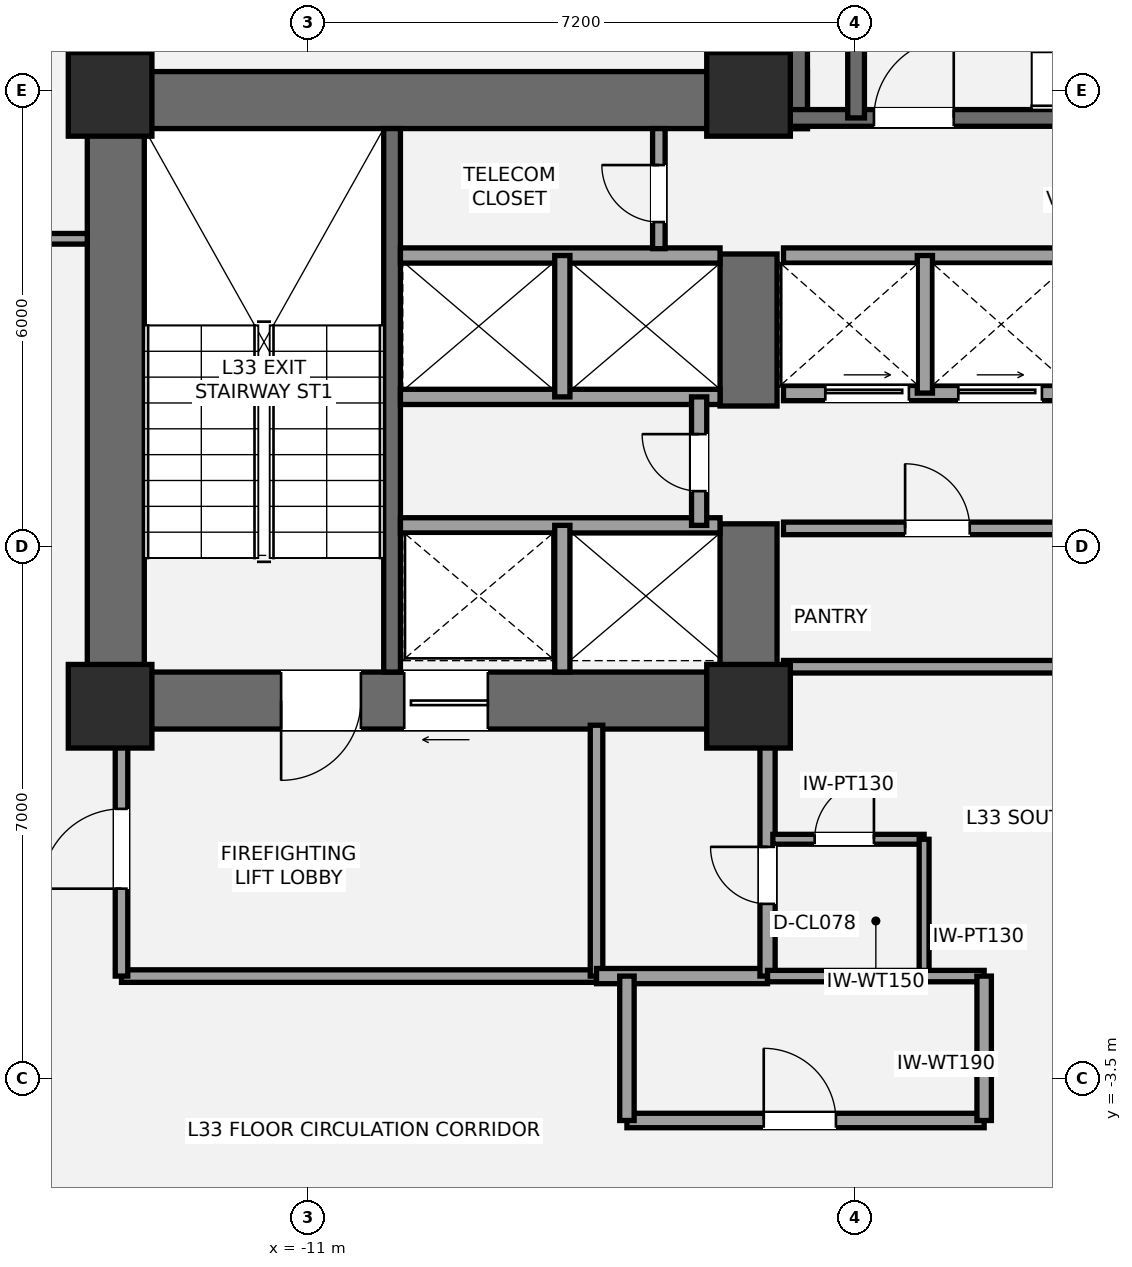
"""IFC4 building model, lengths in metres.
Left out: names, types, materials, properties, quantities, classifications, styles, units other than length and angle.
Written with IfcOpenShell. Run it as: python <this file> out.ifc"""

import sys

from ifc_helpers import new_model, si_unit, direction, frame, frame_2d, origin, origin_2d, place, context, subcontext, project, spatial, rectangle, extrude, element, fill, save


model = new_model("IFC4")
c1 = context("Model", 3, precision=1e-05, world=origin(), true_north=direction((0.0, 1.0)))
c2 = subcontext(c1, "Body", "Model", "MODEL_VIEW")
j1 = project(units=[si_unit("LENGTHUNIT", "METRE"), si_unit("PLANEANGLEUNIT", "RADIAN")], contexts=[c1])
p1 = place(None, origin())
s1 = spatial("IfcSite", under=j1, at=p1, CompositionType="ELEMENT")
p2 = place(p1, origin())
s2 = spatial("IfcBuilding", under=s1, at=p2, CompositionType="ELEMENT")
p3 = place(p2, frame((0.0, 0.0, 124.6)))
s3 = spatial("IfcBuildingStorey", under=s2, at=p3, CompositionType="ELEMENT", Elevation=124.6)
p4 = place(p3, frame((-13.525, 1.1, 0.0), z_axis=(0.0, 0.0, 1.0), x_axis=(0.0, 1.0, 0.0)))
e1 = element("IfcWall", 1, at=p4, inside=s3, PredefinedType="SHEAR", context=c2, shape_type="SweptSolid", body=[
    extrude(rectangle(XDim=8.65, YDim=0.75, at=frame_2d((4.325, 0.0))), origin(), (0.0, 0.0, 1.0), 3.5),
])
p5 = place(p3, frame((-13.9, 9.375, 0.0), z_axis=(0.0, 0.0, 1.0), x_axis=(1.0, 0.0, 0.0)))
e2 = element("IfcWall", 2, at=p5, inside=s3, PredefinedType="SHEAR", context=c2, shape_type="SweptSolid", body=[
    extrude(rectangle(XDim=9.475, YDim=0.75, at=frame_2d((4.737, 0.0))), origin(), (0.0, 0.0, 1.0), 3.5),
])
p6 = place(p3, frame((-4.825, 1.475, 0.0), z_axis=(0.0, 0.0, 1.0), x_axis=(-1.0, 0.0, 0.0)))
e3 = element("IfcWall", 3, at=p6, inside=s3, PredefinedType="SHEAR", context=c2, shape_type="SweptSolid", body=[
    extrude(rectangle(XDim=9.075, YDim=0.75, at=frame_2d((4.538, 0.0))), origin(), (0.0, 0.0, 1.0), 3.5),
])
p7 = place(p6, frame((5.475, 0.0, 0.0)))
e4 = element("IfcOpeningElement", 4, at=p7, cuts=e3, PredefinedType="OPENING", context=c2, shape_type="SweptSolid", body=[
    extrude(rectangle(XDim=1.05, YDim=2.15, at=frame_2d((0.525, 1.075))), frame((0.0, 0.385, 0.0), z_axis=(0.0, -1.0, 0.0), x_axis=(1.0, 0.0, 0.0)), (0.0, 0.0, 1.0), 0.77),
])
p8 = place(p6, frame((3.805, 0.0, 0.0)))
e5 = element("IfcOpeningElement", 5, at=p8, cuts=e3, PredefinedType="OPENING", context=c2, shape_type="SweptSolid", body=[
    extrude(rectangle(XDim=1.1, YDim=2.2, at=frame_2d((0.55, 1.1))), frame((0.0, 0.385, 0.0), z_axis=(0.0, -1.0, 0.0), x_axis=(1.0, 0.0, 0.0)), (0.0, 0.0, 1.0), 0.77),
])
p9 = place(p3, frame((-5.2, 1.1, 0.0), z_axis=(0.0, 0.0, 1.0), x_axis=(0.0, 1.0, 0.0)))
e6 = element("IfcWall", 6, at=p9, inside=s3, PredefinedType="SHEAR", context=c2, shape_type="SweptSolid", body=[
    extrude(rectangle(XDim=2.7, YDim=0.75, at=frame_2d((1.35, 0.0))), origin(), (0.0, 0.0, 1.0), 3.5),
])
p10 = place(p3, frame((-5.2, 5.35, 0.0), z_axis=(0.0, 0.0, 1.0), x_axis=(0.0, 1.0, 0.0)))
e7 = element("IfcWall", 7, at=p10, inside=s3, PredefinedType="SHEAR", context=c2, shape_type="SweptSolid", body=[
    extrude(rectangle(XDim=2.0, YDim=0.75, at=frame_2d((1.0, 0.0))), origin(), (0.0, 0.0, 1.0), 3.5),
])
p11 = place(p3, frame((-9.89, 1.85, 0.0), z_axis=(0.0, 0.0, 1.0), x_axis=(0.0, 1.0, 0.0)))
e8 = element("IfcWall", 8, at=p11, inside=s3, PredefinedType="SHEAR", context=c2, shape_type="SweptSolid", body=[
    extrude(rectangle(XDim=7.15, YDim=0.22, at=frame_2d((3.575, 0.0))), origin(), (0.0, 0.0, 1.0), 3.5),
])
p12 = place(p3, frame((-4.8, 9.0, 0.0), z_axis=(0.0, 0.0, 1.0), x_axis=(0.0, 1.0, 0.0)))
e9 = element("IfcWall", 9, at=p12, inside=s3, PredefinedType="SHEAR", context=c2, shape_type="SweptSolid", body=[
    extrude(rectangle(XDim=4.15, YDim=0.75, at=frame_2d((2.075, 0.0))), origin(), (0.0, 0.0, 1.0), 3.5),
])
p13 = place(p3, frame((-4.7, 9.14, 0.0), z_axis=(0.0, 0.0, 1.0), x_axis=(1.0, 0.0, 0.0)))
e10 = element("IfcWall", 10, at=p13, inside=s3, PredefinedType="SHEAR", context=c2, shape_type="SweptSolid", body=[
    extrude(rectangle(XDim=9.3, YDim=0.22, at=frame_2d((4.65, 0.0))), origin(), (0.0, 0.0, 1.0), 3.5),
])
p14 = place(p13, frame((1.15, 0.0, 0.0)))
e11 = element("IfcOpeningElement", 11, at=p14, cuts=e10, PredefinedType="OPENING", context=c2, shape_type="SweptSolid", body=[
    extrude(rectangle(XDim=1.05, YDim=2.15, at=frame_2d((0.525, 1.075))), frame((0.0, 0.12, 0.0), z_axis=(0.0, -1.0, 0.0), x_axis=(1.0, 0.0, 0.0)), (0.0, 0.0, 1.0), 0.24),
])
p15 = place(p3, frame((-3.785, 9.14, 0.0), z_axis=(0.0, 0.0, 1.0), x_axis=(0.0, 1.0, 0.0)))
e12 = element("IfcWall", 12, at=p15, inside=s3, PredefinedType="SHEAR", context=c2, shape_type="SweptSolid", body=[
    extrude(rectangle(XDim=3.26, YDim=0.22, at=frame_2d((1.63, 0.0))), origin(), (0.0, 0.0, 1.0), 3.5),
])
for number, where, z_axis, x_axis in (
    (13, (-13.6, 1.4, 0.0), (0.0, 0.0, 1.0), (1.0, 0.0, 0.0)),
    (14, (-13.6, 9.45, 0.0), (0.0, 0.0, 1.0), (1.0, 0.0, 0.0)),
    (15, (-5.2, 1.4, 0.0), (0.0, 0.0, 1.0), (1.0, 0.0, 0.0)),
    (16, (-5.2, 9.45, 0.0), (0.0, 0.0, 1.0), (1.0, 0.0, 0.0)),
):
    element("IfcColumn", number, at=place(p3, frame(where, z_axis=z_axis, x_axis=x_axis)), inside=s3, PredefinedType="COLUMN", context=c2, shape_type="SweptSolid", body=[
        extrude(rectangle(XDim=1.1, YDim=1.1, at=origin_2d()), origin(), (0.0, 0.0, 1.0), 3.5),
    ])
p16 = place(p3, frame((-13.45, -2.15, 0.0), z_axis=(0.0, 0.0, 1.0), x_axis=(1.0, 0.0, 0.0)))
e17 = element("IfcWall", 17, at=p16, inside=s3, PredefinedType="PARTITIONING", context=c2, shape_type="SweptSolid", body=[
    extrude(rectangle(XDim=6.25, YDim=0.165, at=frame_2d((3.125, 0.0))), origin(), (0.0, 0.0, 1.0), 3.31),
])
p17 = place(p3, frame((-13.45, -2.15, 0.0), z_axis=(0.0, 0.0, 1.0), x_axis=(0.0, 1.0, 0.0)))
e18 = element("IfcWall", 18, at=p17, inside=s3, PredefinedType="PARTITIONING", context=c2, shape_type="SweptSolid", body=[
    extrude(rectangle(XDim=3.3, YDim=0.165, at=frame_2d((1.65, 0.0))), origin(), (0.0, 0.0, 1.0), 2.763),
])
p18 = place(p17, frame((1.15, 0.0, 0.0)))
e19 = element("IfcOpeningElement", 19, at=p18, cuts=e18, PredefinedType="OPENING", context=c2, shape_type="SweptSolid", body=[
    extrude(rectangle(XDim=1.05, YDim=2.15, at=frame_2d((0.525, 1.075))), frame((0.0, 0.093, 0.0), z_axis=(0.0, -1.0, 0.0), x_axis=(1.0, 0.0, 0.0)), (0.0, 0.0, 1.0), 0.185),
])
p19 = place(p3, frame((-7.2, -2.15, 0.0), z_axis=(0.0, 0.0, 1.0), x_axis=(0.0, 1.0, 0.0)))
e20 = element("IfcWall", 20, at=p19, inside=s3, PredefinedType="PARTITIONING", context=c2, shape_type="SweptSolid", body=[
    extrude(rectangle(XDim=3.3, YDim=0.165, at=frame_2d((1.65, 0.0))), origin(), (0.0, 0.0, 1.0), 2.763),
])
p20 = place(p3, frame((-7.2, -2.15, 0.0), z_axis=(0.0, 0.0, 1.0), x_axis=(1.0, 0.0, 0.0)))
e21 = element("IfcWall", 21, at=p20, inside=s3, PredefinedType="SOLIDWALL", context=c2, shape_type="SweptSolid", body=[
    extrude(rectangle(XDim=2.25, YDim=0.2, at=frame_2d((1.125, 0.0))), origin(), (0.0, 0.0, 1.0), 2.763),
])
p21 = place(p3, frame((-4.95, -2.15, 0.0), z_axis=(0.0, 0.0, 1.0), x_axis=(0.0, 1.0, 0.0)))
e22 = element("IfcWall", 22, at=p21, inside=s3, PredefinedType="SOLIDWALL", context=c2, shape_type="SweptSolid", body=[
    extrude(rectangle(XDim=3.3, YDim=0.2, at=frame_2d((1.65, 0.0))), origin(), (0.0, 0.0, 1.0), 2.763),
])
p22 = place(p21, frame((0.95, 0.0, 0.0)))
e23 = element("IfcOpeningElement", 23, at=p22, cuts=e22, PredefinedType="OPENING", context=c2, shape_type="SweptSolid", body=[
    extrude(rectangle(XDim=0.75, YDim=2.1, at=frame_2d((0.375, 1.05))), frame((0.0, 0.11, 0.0), z_axis=(0.0, -1.0, 0.0), x_axis=(1.0, 0.0, 0.0)), (0.0, 0.0, 1.0), 0.22),
])
p23 = place(p3, frame((-4.88, -0.35, 0.0), z_axis=(0.0, 0.0, 1.0), x_axis=(1.0, 0.0, 0.0)))
e24 = element("IfcWall", 24, at=p23, inside=s3, PredefinedType="PARTITIONING", context=c2, shape_type="SweptSolid", body=[
    extrude(rectangle(XDim=1.99, YDim=0.13, at=frame_2d((0.995, 0.0))), origin(), (0.0, 0.0, 1.0), 3.31),
])
p24 = place(p23, frame((0.55, 0.0, 0.0)))
e25 = element("IfcOpeningElement", 25, at=p24, cuts=e24, PredefinedType="OPENING", context=c2, shape_type="SweptSolid", body=[
    extrude(rectangle(XDim=0.78, YDim=2.1, at=frame_2d((0.39, 1.05))), frame((0.0, 0.075, 0.0), z_axis=(0.0, -1.0, 0.0), x_axis=(1.0, 0.0, 0.0)), (0.0, 0.0, 1.0), 0.15),
])
p25 = place(p3, frame((-2.89, -2.15, 0.0), z_axis=(0.0, 0.0, 1.0), x_axis=(0.0, 1.0, 0.0)))
e26 = element("IfcWall", 26, at=p25, inside=s3, PredefinedType="PARTITIONING", context=c2, shape_type="SweptSolid", body=[
    extrude(rectangle(XDim=1.8, YDim=0.13, at=frame_2d((0.9, 0.0))), origin(), (0.0, 0.0, 1.0), 2.763),
])
p26 = place(p3, frame((-9.78, 3.78, 0.0), z_axis=(0.0, 0.0, 1.0), x_axis=(1.0, 0.0, 0.0)))
e27 = element("IfcWall", 27, at=p26, inside=s3, PredefinedType="SOLIDWALL", context=c2, shape_type="SweptSolid", body=[
    extrude(rectangle(XDim=4.205, YDim=0.2, at=frame_2d((2.103, 0.0))), origin(), (0.0, 0.0, 1.0), 3.31),
])
p27 = place(p3, frame((-7.65, 1.85, 0.0), z_axis=(0.0, 0.0, 1.0), x_axis=(0.0, 1.0, 0.0)))
e28 = element("IfcWall", 28, at=p27, inside=s3, PredefinedType="SOLIDWALL", context=c2, shape_type="SweptSolid", body=[
    extrude(rectangle(XDim=1.93, YDim=0.2, at=frame_2d((0.965, 0.0))), origin(), (0.0, 0.0, 1.0), 3.31),
])
for number, where, z_axis, x_axis in (
    (29, (-9.78, 5.47, 0.0), (0.0, 0.0, 1.0), (1.0, 0.0, 0.0)),
    (30, (-9.78, 7.33, 0.0), (0.0, 0.0, 1.0), (1.0, 0.0, 0.0)),
):
    element("IfcWall", number, at=place(p3, frame(where, z_axis=z_axis, x_axis=x_axis)), inside=s3, PredefinedType="SOLIDWALL", context=c2, shape_type="SweptSolid", body=[
        extrude(rectangle(XDim=4.205, YDim=0.2, at=frame_2d((2.103, 0.0))), origin(), (0.0, 0.0, 1.0), 3.31),
    ])
p28 = place(p3, frame((-7.65, 5.47, 0.0), z_axis=(0.0, 0.0, 1.0), x_axis=(0.0, 1.0, 0.0)))
e31 = element("IfcWall", 31, at=p28, inside=s3, PredefinedType="SOLIDWALL", context=c2, shape_type="SweptSolid", body=[
    extrude(rectangle(XDim=1.86, YDim=0.2, at=frame_2d((0.93, 0.0))), origin(), (0.0, 0.0, 1.0), 3.31),
])
p29 = place(p3, frame((-5.85, 3.78, 0.0), z_axis=(0.0, 0.0, 1.0), x_axis=(0.0, 1.0, 0.0)))
e32 = element("IfcWall", 32, at=p29, inside=s3, PredefinedType="SOLIDWALL", context=c2, shape_type="SweptSolid", body=[
    extrude(rectangle(XDim=1.69, YDim=0.2, at=frame_2d((0.845, 0.0))), origin(), (0.0, 0.0, 1.0), 3.31),
])
p30 = place(p29, frame((0.45, 0.0, 0.0)))
e33 = element("IfcOpeningElement", 33, at=p30, cuts=e32, PredefinedType="OPENING", context=c2, shape_type="SweptSolid", body=[
    extrude(rectangle(XDim=0.75, YDim=2.1, at=frame_2d((0.375, 1.05))), frame((0.0, 0.11, 0.0), z_axis=(0.0, -1.0, 0.0), x_axis=(1.0, 0.0, 0.0)), (0.0, 0.0, 1.0), 0.22),
])
p31 = place(p3, frame((-4.74, 1.92, 0.0), z_axis=(0.0, 0.0, 1.0), x_axis=(1.0, 0.0, 0.0)))
e34 = element("IfcWall", 34, at=p31, inside=s3, PredefinedType="PARTITIONING", context=c2, shape_type="SweptSolid", body=[
    extrude(rectangle(XDim=3.89, YDim=0.165, at=frame_2d((1.945, 0.0))), origin(), (0.0, 0.0, 1.0), 2.3),
])
p32 = place(p3, frame((-4.74, 3.74, 0.0), z_axis=(0.0, 0.0, 1.0), x_axis=(1.0, 0.0, 0.0)))
e35 = element("IfcWall", 35, at=p32, inside=s3, PredefinedType="PARTITIONING", context=c2, shape_type="SweptSolid", body=[
    extrude(rectangle(XDim=3.89, YDim=0.165, at=frame_2d((1.945, 0.0))), origin(), (0.0, 0.0, 1.0), 3.31),
])
p33 = place(p32, frame((1.6, 0.0, 0.0)))
e36 = element("IfcOpeningElement", 36, at=p33, cuts=e35, PredefinedType="OPENING", context=c2, shape_type="SweptSolid", body=[
    extrude(rectangle(XDim=0.85, YDim=2.1, at=frame_2d((0.425, 1.05))), frame((0.0, 0.093, 0.0), z_axis=(0.0, -1.0, 0.0), x_axis=(1.0, 0.0, 0.0)), (0.0, 0.0, 1.0), 0.185),
])
p34 = place(p3, frame((-4.74, 5.52, 0.0), z_axis=(0.0, 0.0, 1.0), x_axis=(1.0, 0.0, 0.0)))
e37 = element("IfcWall", 37, at=p34, inside=s3, PredefinedType="SOLIDWALL", context=c2, shape_type="SweptSolid", body=[
    extrude(rectangle(XDim=3.86, YDim=0.2, at=frame_2d((1.93, 0.0))), origin(), (0.0, 0.0, 1.0), 3.31),
])
p35 = place(p34, frame((0.55, 0.0, 0.0)))
e38 = element("IfcOpeningElement", 38, at=p35, cuts=e37, PredefinedType="OPENING", context=c2, shape_type="SweptSolid", body=[
    extrude(rectangle(XDim=1.1, YDim=2.2, at=frame_2d((0.55, 1.1))), frame((0.0, 0.11, 0.0), z_axis=(0.0, -1.0, 0.0), x_axis=(1.0, 0.0, 0.0)), (0.0, 0.0, 1.0), 0.22),
])
p36 = place(p34, frame((2.3, 0.0, 0.0)))
e39 = element("IfcOpeningElement", 39, at=p36, cuts=e37, PredefinedType="OPENING", context=c2, shape_type="SweptSolid", body=[
    extrude(rectangle(XDim=1.1, YDim=2.2, at=frame_2d((0.55, 1.1))), frame((0.0, 0.11, 0.0), z_axis=(0.0, -1.0, 0.0), x_axis=(1.0, 0.0, 0.0)), (0.0, 0.0, 1.0), 0.22),
])
p37 = place(p3, frame((-4.74, 7.33, 0.0), z_axis=(0.0, 0.0, 1.0), x_axis=(1.0, 0.0, 0.0)))
e40 = element("IfcWall", 40, at=p37, inside=s3, PredefinedType="SOLIDWALL", context=c2, shape_type="SweptSolid", body=[
    extrude(rectangle(XDim=3.86, YDim=0.2, at=frame_2d((1.93, 0.0))), origin(), (0.0, 0.0, 1.0), 3.31),
])
p38 = place(p3, frame((-2.88, 5.52, 0.0), z_axis=(0.0, 0.0, 1.0), x_axis=(0.0, 1.0, 0.0)))
e41 = element("IfcWall", 41, at=p38, inside=s3, PredefinedType="SOLIDWALL", context=c2, shape_type="SweptSolid", body=[
    extrude(rectangle(XDim=1.81, YDim=0.2, at=frame_2d((0.905, 0.0))), origin(), (0.0, 0.0, 1.0), 3.31),
])
p39 = place(p3, frame((-6.38, 7.42, 0.0), z_axis=(0.0, 0.0, 1.0), x_axis=(0.0, 1.0, 0.0)))
e42 = element("IfcWall", 42, at=p39, inside=s3, PredefinedType="PARTITIONING", context=c2, shape_type="SweptSolid", body=[
    extrude(rectangle(XDim=1.58, YDim=0.165, at=frame_2d((0.79, 0.0))), origin(), (0.0, 0.0, 1.0), 3.31),
])
p40 = place(p39, frame((0.35, 0.0, 0.0)))
e43 = element("IfcOpeningElement", 43, at=p40, cuts=e42, PredefinedType="OPENING", context=c2, shape_type="SweptSolid", body=[
    extrude(rectangle(XDim=0.75, YDim=2.1, at=frame_2d((0.375, 1.05))), frame((0.0, 0.093, 0.0), z_axis=(0.0, -1.0, 0.0), x_axis=(1.0, 0.0, 0.0)), (0.0, 0.0, 1.0), 0.185),
])
p41 = place(p3, frame((-6.8, -4.05, 0.0), z_axis=(0.0, 0.0, 1.0), x_axis=(1.0, 0.0, 0.0)))
e44 = element("IfcWall", 44, at=p41, inside=s3, PredefinedType="PLUMBINGWALL", context=c2, shape_type="SweptSolid", body=[
    extrude(rectangle(XDim=4.7, YDim=0.19, at=frame_2d((2.35, 0.0))), origin(), (0.0, 0.0, 1.0), 3.31),
])
p42 = place(p41, frame((1.8, 0.0, 0.0)))
e45 = element("IfcOpeningElement", 45, at=p42, cuts=e44, PredefinedType="OPENING", context=c2, shape_type="SweptSolid", body=[
    extrude(rectangle(XDim=0.95, YDim=2.15, at=frame_2d((0.475, 1.075))), frame((0.0, 0.105, 0.0), z_axis=(0.0, -1.0, 0.0), x_axis=(1.0, 0.0, 0.0)), (0.0, 0.0, 1.0), 0.21),
])
p43 = place(p3, frame((-4.95, -2.15, 0.0), z_axis=(0.0, 0.0, 1.0), x_axis=(1.0, 0.0, 0.0)))
e46 = element("IfcWall", 46, at=p43, inside=s3, PredefinedType="PLUMBINGWALL", context=c2, shape_type="SweptSolid", body=[
    extrude(rectangle(XDim=2.85, YDim=0.15, at=frame_2d((1.425, 0.0))), origin(), (0.0, 0.0, 1.0), 2.763),
])
for number, where, z_axis, x_axis in (
    (47, (-6.8, -4.05, 0.0), (0.0, 0.0, 1.0), (0.0, 1.0, 0.0)),
    (48, (-2.1, -4.05, 0.0), (0.0, 0.0, 1.0), (0.0, 1.0, 0.0)),
):
    element("IfcWall", number, at=place(p3, frame(where, z_axis=z_axis, x_axis=x_axis)), inside=s3, PredefinedType="PLUMBINGWALL", context=c2, shape_type="SweptSolid", body=[
        extrude(rectangle(XDim=1.9, YDim=0.19, at=frame_2d((0.95, 0.0))), origin(), (0.0, 0.0, 1.0), 2.763),
    ])
p44 = place(p3, frame((-16.2, 7.55, 0.0), z_axis=(0.0, 0.0, 1.0), x_axis=(1.0, 0.0, 0.0)))
e49 = element("IfcWall", 49, at=p44, inside=s3, PredefinedType="PARTITIONING", context=c2, shape_type="SweptSolid", body=[
    extrude(rectangle(XDim=2.3, YDim=0.14, at=frame_2d((1.15, 0.0))), origin(), (0.0, 0.0, 1.0), 3.31),
])
p45 = place(p44, frame((0.32, 0.0, 0.0)))
e50 = element("IfcOpeningElement", 50, at=p45, cuts=e49, PredefinedType="OPENING", context=c2, shape_type="SweptSolid", body=[
    extrude(rectangle(XDim=0.92, YDim=2.15, at=frame_2d((0.46, 1.075))), frame((0.0, 0.08, 0.0), z_axis=(0.0, -1.0, 0.0), x_axis=(1.0, 0.0, 0.0)), (0.0, 0.0, 1.0), 0.16),
])
p46 = place(p7, origin())
e51 = element("IfcDoor", 51, at=p46, inside=s3, OperationType="SINGLE_SWING_RIGHT", PredefinedType="DOOR", context=c2, shape_type="SweptSolid", body=[
    extrude(rectangle(XDim=1.05, YDim=2.15, at=frame_2d((0.525, 1.075))), frame((0.0, 0.025, 0.0), z_axis=(0.0, -1.0, 0.0), x_axis=(1.0, 0.0, 0.0)), (0.0, 0.0, 1.0), 0.05),
])
fill(e4, e51)
p47 = place(p14, origin())
e52 = element("IfcDoor", 52, at=p47, inside=s3, OperationType="SINGLE_SWING_RIGHT", PredefinedType="DOOR", context=c2, shape_type="SweptSolid", body=[
    extrude(rectangle(XDim=1.05, YDim=2.15, at=frame_2d((0.525, 1.075))), frame((0.0, 0.025, 0.0), z_axis=(0.0, -1.0, 0.0), x_axis=(1.0, 0.0, 0.0)), (0.0, 0.0, 1.0), 0.05),
])
fill(e11, e52)
p48 = place(p18, origin())
e53 = element("IfcDoor", 53, at=p48, inside=s3, OperationType="SINGLE_SWING_LEFT", PredefinedType="DOOR", context=c2, shape_type="SweptSolid", body=[
    extrude(rectangle(XDim=1.05, YDim=2.15, at=frame_2d((0.525, 1.075))), frame((0.0, 0.025, 0.0), z_axis=(0.0, -1.0, 0.0), x_axis=(1.0, 0.0, 0.0)), (0.0, 0.0, 1.0), 0.05),
])
fill(e19, e53)
p49 = place(p22, origin())
e54 = element("IfcDoor", 54, at=p49, inside=s3, OperationType="SINGLE_SWING_RIGHT", PredefinedType="DOOR", context=c2, shape_type="SweptSolid", body=[
    extrude(rectangle(XDim=0.75, YDim=2.1, at=frame_2d((0.375, 1.05))), frame((0.0, 0.025, 0.0), z_axis=(0.0, -1.0, 0.0), x_axis=(1.0, 0.0, 0.0)), (0.0, 0.0, 1.0), 0.05),
])
fill(e23, e54)
p50 = place(p24, origin())
e55 = element("IfcDoor", 55, at=p50, inside=s3, OperationType="SINGLE_SWING_RIGHT", PredefinedType="DOOR", context=c2, shape_type="SweptSolid", body=[
    extrude(rectangle(XDim=0.78, YDim=2.1, at=frame_2d((0.39, 1.05))), frame((0.0, 0.025, 0.0), z_axis=(0.0, -1.0, 0.0), x_axis=(1.0, 0.0, 0.0)), (0.0, 0.0, 1.0), 0.05),
])
fill(e25, e55)
p51 = place(p8, origin())
e56 = element("IfcDoor", 56, at=p51, inside=s3, OperationType="SLIDING_TO_LEFT", PredefinedType="DOOR", context=c2, shape_type="SweptSolid", body=[
    extrude(rectangle(XDim=1.1, YDim=2.2, at=frame_2d((0.55, 1.1))), frame((0.0, 0.025, 0.0), z_axis=(0.0, -1.0, 0.0), x_axis=(1.0, 0.0, 0.0)), (0.0, 0.0, 1.0), 0.05),
])
fill(e5, e56)
p52 = place(p30, origin())
e57 = element("IfcDoor", 57, at=p52, inside=s3, OperationType="SINGLE_SWING_RIGHT", PredefinedType="DOOR", context=c2, shape_type="SweptSolid", body=[
    extrude(rectangle(XDim=0.75, YDim=2.1, at=frame_2d((0.375, 1.05))), frame((0.0, 0.025, 0.0), z_axis=(0.0, -1.0, 0.0), x_axis=(1.0, 0.0, 0.0)), (0.0, 0.0, 1.0), 0.05),
])
fill(e33, e57)
p53 = place(p33, origin())
e58 = element("IfcDoor", 58, at=p53, inside=s3, OperationType="SINGLE_SWING_LEFT", PredefinedType="DOOR", context=c2, shape_type="SweptSolid", body=[
    extrude(rectangle(XDim=0.85, YDim=2.1, at=frame_2d((0.425, 1.05))), frame((0.0, 0.025, 0.0), z_axis=(0.0, -1.0, 0.0), x_axis=(1.0, 0.0, 0.0)), (0.0, 0.0, 1.0), 0.05),
])
fill(e36, e58)
p54 = place(p35, origin())
e59 = element("IfcDoor", 59, at=p54, inside=s3, OperationType="SLIDING_TO_LEFT", PredefinedType="DOOR", context=c2, shape_type="SweptSolid", body=[
    extrude(rectangle(XDim=1.1, YDim=2.2, at=frame_2d((0.55, 1.1))), frame((0.0, 0.025, 0.0), z_axis=(0.0, -1.0, 0.0), x_axis=(1.0, 0.0, 0.0)), (0.0, 0.0, 1.0), 0.05),
])
fill(e38, e59)
p55 = place(p36, origin())
e60 = element("IfcDoor", 60, at=p55, inside=s3, OperationType="SLIDING_TO_LEFT", PredefinedType="DOOR", context=c2, shape_type="SweptSolid", body=[
    extrude(rectangle(XDim=1.1, YDim=2.2, at=frame_2d((0.55, 1.1))), frame((0.0, 0.025, 0.0), z_axis=(0.0, -1.0, 0.0), x_axis=(1.0, 0.0, 0.0)), (0.0, 0.0, 1.0), 0.05),
])
fill(e39, e60)
p56 = place(p40, origin())
e61 = element("IfcDoor", 61, at=p56, inside=s3, OperationType="SINGLE_SWING_RIGHT", PredefinedType="DOOR", context=c2, shape_type="SweptSolid", body=[
    extrude(rectangle(XDim=0.75, YDim=2.1, at=frame_2d((0.375, 1.05))), frame((0.0, 0.025, 0.0), z_axis=(0.0, -1.0, 0.0), x_axis=(1.0, 0.0, 0.0)), (0.0, 0.0, 1.0), 0.05),
])
fill(e43, e61)
p57 = place(p42, origin())
e62 = element("IfcDoor", 62, at=p57, inside=s3, OperationType="SINGLE_SWING_LEFT", PredefinedType="DOOR", context=c2, shape_type="SweptSolid", body=[
    extrude(rectangle(XDim=0.95, YDim=2.15, at=frame_2d((0.475, 1.075))), frame((0.0, 0.025, 0.0), z_axis=(0.0, -1.0, 0.0), x_axis=(1.0, 0.0, 0.0)), (0.0, 0.0, 1.0), 0.05),
])
fill(e45, e62)
save(model, sys.argv[1])
